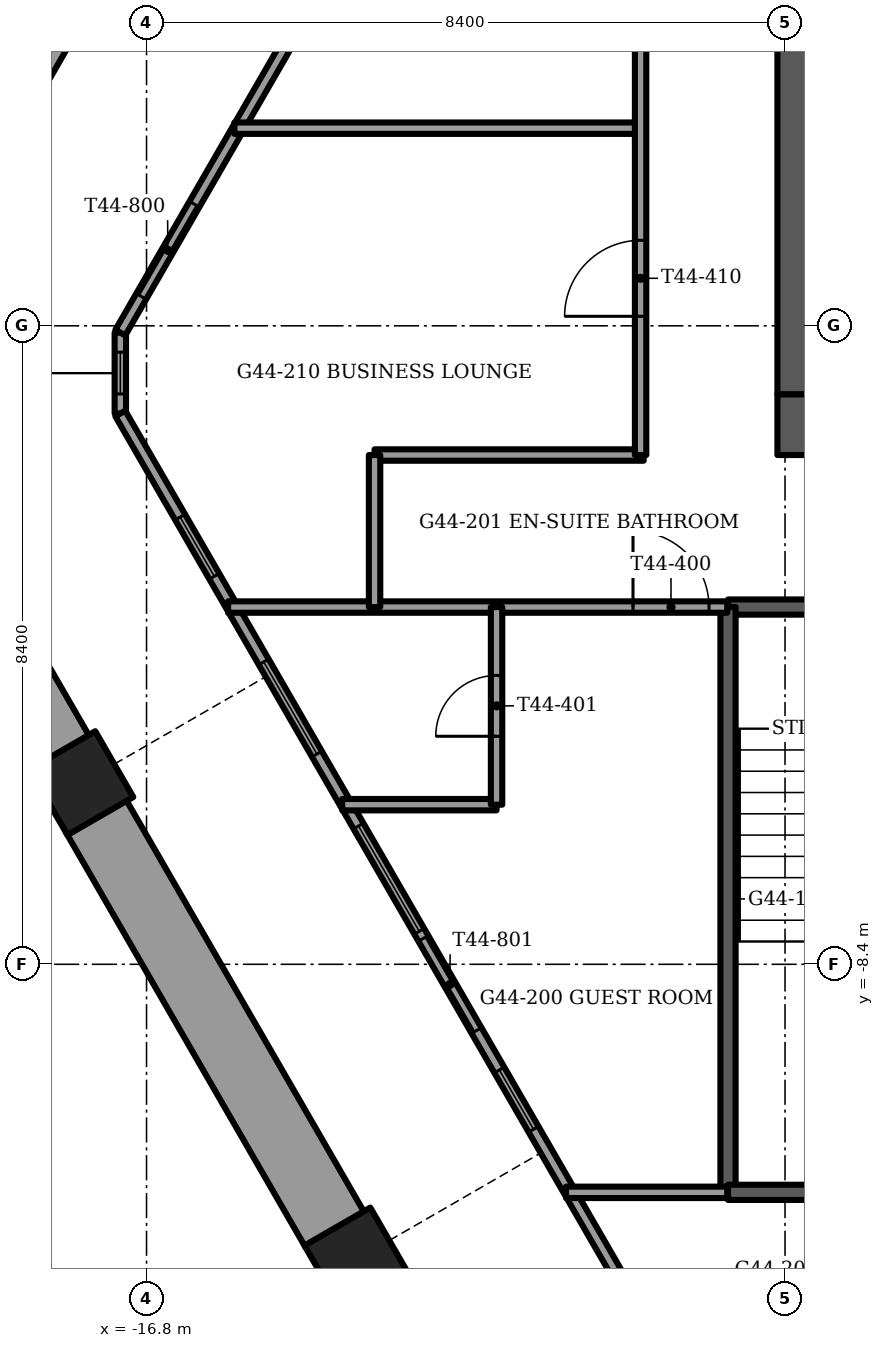
"""IFC4 building model, lengths in metres.
Left out: names, types, materials, properties, quantities, classifications, styles, units other than length and angle.
Written with IfcOpenShell. Run it as: python <this file> out.ifc"""

import sys

from ifc_helpers import new_model, si_unit, direction, frame, frame_2d, origin, origin_2d, place, context, subcontext, project, spatial, rectangle, extrude, element, fill, save


model = new_model("IFC4")
c1 = context("Model", 3, precision=1e-05, world=origin(), true_north=direction((0.0, 1.0)))
c2 = subcontext(c1, "Body", "Model", "MODEL_VIEW")
j1 = project(units=[si_unit("LENGTHUNIT", "METRE"), si_unit("PLANEANGLEUNIT", "RADIAN")], contexts=[c1])
p1 = place(None, origin())
s1 = spatial("IfcSite", under=j1, at=p1, CompositionType="ELEMENT")
p2 = place(p1, origin())
s2 = spatial("IfcBuilding", under=s1, at=p2, CompositionType="ELEMENT")
p3 = place(p2, frame((0.0, 0.0, 179.5)))
s3 = spatial("IfcBuildingStorey", under=s2, at=p3, CompositionType="ELEMENT", Elevation=179.5)
for number, where, z_axis, x_axis in (
    (1, (-17.657, -6.017, -1.2), (0.0, 0.0, 1.0), (-0.5, 0.866, 0.0)),
    (2, (-14.039, -12.283, -1.2), (0.0, 0.0, 1.0), (-0.5, 0.866, 0.0)),
):
    element("IfcColumn", number, at=place(p3, frame(where, z_axis=z_axis, x_axis=x_axis)), inside=s3, PredefinedType="COLUMN", context=c2, shape_type="SweptSolid", body=[
        extrude(rectangle(XDim=1.0, YDim=1.0, at=origin_2d()), origin(), (0.0, 0.0, 1.0), 3.75),
    ])
p4 = place(p3, frame((-8.5, -1.3, -0.3), z_axis=(0.0, 0.0, 1.0), x_axis=(1.0, 0.0, 0.0)))
e3 = element("IfcWall", 3, at=p4, inside=s3, PredefinedType="SHEAR", context=c2, shape_type="SweptSolid", body=[
    extrude(rectangle(XDim=17.0, YDim=0.8, at=frame_2d((8.5, 0.0))), origin(), (0.0, 0.0, 1.0), 3.75),
])
p5 = place(p4, frame((7.7, 0.0, 0.0)))
e4 = element("IfcOpeningElement", 4, at=p5, cuts=e3, PredefinedType="OPENING", context=c2, shape_type="SweptSolid", body=[
    extrude(rectangle(XDim=1.6, YDim=2.1, at=frame_2d((0.8, 1.05))), frame((0.0, 0.4, 0.0), z_axis=(0.0, -1.0, 0.0), x_axis=(1.0, 0.0, 0.0)), (0.0, 0.0, 1.0), 0.8),
])
p6 = place(p3, frame((-8.1, -0.9, -0.3), z_axis=(0.0, 0.0, 1.0), x_axis=(0.0, 1.0, 0.0)))
e5 = element("IfcWall", 5, at=p6, inside=s3, PredefinedType="SHEAR", context=c2, shape_type="SweptSolid", body=[
    extrude(rectangle(XDim=9.8, YDim=0.8, at=frame_2d((4.9, 0.0))), origin(), (0.0, 0.0, 1.0), 3.75),
])
p7 = place(p6, frame((8.15, 0.0, 0.0)))
e6 = element("IfcOpeningElement", 6, at=p7, cuts=e5, PredefinedType="OPENING", context=c2, shape_type="SweptSolid", body=[
    extrude(rectangle(XDim=1.1, YDim=2.1, at=frame_2d((0.55, 1.05))), frame((0.0, 0.4, 0.0), z_axis=(0.0, -1.0, 0.0), x_axis=(1.0, 0.0, 0.0)), (0.0, 0.0, 1.0), 0.8),
])
p8 = place(p3, frame((-17.397, 5.324, 0.0), z_axis=(0.0, 0.0, 1.0), x_axis=(-0.500017688138, -0.866015191293, 0.0)))
e7 = element("IfcWall", 7, at=p8, inside=s3, PredefinedType="PARAPET", context=c2, shape_type="SweptSolid", body=[
    extrude(rectangle(XDim=6.323, YDim=0.9, at=frame_2d((3.162, 0.0))), origin(), (0.0, 0.0, 1.0), 1.1),
])
p9 = place(p3, frame((-20.559, -1.092, 0.0), z_axis=(0.0, 0.0, 1.0), x_axis=(0.500023253097, -0.866011978186, 0.0)))
e8 = element("IfcWall", 8, at=p9, inside=s3, PredefinedType="PARAPET", context=c2, shape_type="SweptSolid", body=[
    extrude(rectangle(XDim=5.246, YDim=0.9, at=frame_2d((2.623, 0.0))), origin(), (0.0, 0.0, 1.0), 1.1),
])
p10 = place(p3, frame((-17.466, -6.449, 0.0), z_axis=(0.0, 0.0, 1.0), x_axis=(0.500013351051, -0.866017695414, 0.0)))
e9 = element("IfcWall", 9, at=p10, inside=s3, PredefinedType="PARAPET", context=c2, shape_type="SweptSolid", body=[
    extrude(rectangle(XDim=6.296, YDim=0.9, at=frame_2d((3.148, 0.0))), origin(), (0.0, 0.0, 1.0), 1.1),
])
p11 = place(p3, frame((-7.109, 17.292, 0.0), z_axis=(0.0, 0.0, 1.0), x_axis=(-0.499999728453, -0.866025560562, 0.0)))
e10 = element("IfcWall", 10, at=p11, inside=s3, PredefinedType="SOLIDWALL", context=c2, shape_type="SweptSolid", body=[
    extrude(rectangle(XDim=20.071, YDim=0.15, at=frame_2d((10.035, 0.0))), origin(), (0.0, 0.0, 1.0), 3.45),
])
p12 = place(p11, frame((3.868, 0.0, 0.15)))
e11 = element("IfcOpeningElement", 11, at=p12, cuts=e10, PredefinedType="OPENING", context=c2, shape_type="SweptSolid", body=[
    extrude(rectangle(XDim=1.4, YDim=2.85, at=frame_2d((0.7, 1.425))), frame((0.0, 0.075, 0.0), z_axis=(0.0, -1.0, 0.0), x_axis=(1.0, 0.0, 0.0)), (0.0, 0.0, 1.0), 0.15),
])
p13 = place(p11, frame((7.521, 0.0, 0.15)))
e12 = element("IfcOpeningElement", 12, at=p13, cuts=e10, PredefinedType="OPENING", context=c2, shape_type="SweptSolid", body=[
    extrude(rectangle(XDim=1.6, YDim=2.85, at=frame_2d((0.8, 1.425))), frame((0.0, 0.075, 0.0), z_axis=(0.0, -1.0, 0.0), x_axis=(1.0, 0.0, 0.0)), (0.0, 0.0, 1.0), 0.15),
])
p14 = place(p11, frame((9.721, 0.0, 0.15)))
e13 = element("IfcOpeningElement", 13, at=p14, cuts=e10, PredefinedType="OPENING", context=c2, shape_type="SweptSolid", body=[
    extrude(rectangle(XDim=1.4, YDim=2.85, at=frame_2d((0.7, 1.425))), frame((0.0, 0.075, 0.0), z_axis=(0.0, -1.0, 0.0), x_axis=(1.0, 0.0, 0.0)), (0.0, 0.0, 1.0), 0.15),
])
p15 = place(p11, frame((11.721, 0.0, 0.15)))
e14 = element("IfcOpeningElement", 14, at=p15, cuts=e10, PredefinedType="OPENING", context=c2, shape_type="SweptSolid", body=[
    extrude(rectangle(XDim=1.6, YDim=2.85, at=frame_2d((0.8, 1.425))), frame((0.0, 0.075, 0.0), z_axis=(0.0, -1.0, 0.0), x_axis=(1.0, 0.0, 0.0)), (0.0, 0.0, 1.0), 0.15),
])
p16 = place(p11, frame((13.921, 0.0, 0.15)))
e15 = element("IfcOpeningElement", 15, at=p16, cuts=e10, PredefinedType="OPENING", context=c2, shape_type="SweptSolid", body=[
    extrude(rectangle(XDim=1.4, YDim=2.85, at=frame_2d((0.7, 1.425))), frame((0.0, 0.075, 0.0), z_axis=(0.0, -1.0, 0.0), x_axis=(1.0, 0.0, 0.0)), (0.0, 0.0, 1.0), 0.15),
])
p17 = place(p11, frame((18.121, 0.0, 0.0)))
e16 = element("IfcOpeningElement", 16, at=p17, cuts=e10, PredefinedType="OPENING", context=c2, shape_type="SweptSolid", body=[
    extrude(rectangle(XDim=1.4, YDim=2.4, at=frame_2d((0.7, 1.2))), frame((0.0, 0.075, 0.0), z_axis=(0.0, -1.0, 0.0), x_axis=(1.0, 0.0, 0.0)), (0.0, 0.0, 1.0), 0.15),
])
p18 = place(p11, frame((0.452, 0.0, 0.15)))
e17 = element("IfcOpeningElement", 17, at=p18, cuts=e10, PredefinedType="OPENING", context=c2, shape_type="SweptSolid", body=[
    extrude(rectangle(XDim=1.6, YDim=2.73, at=frame_2d((0.8, 1.365))), frame((0.0, 0.075, 0.0), z_axis=(0.0, -1.0, 0.0), x_axis=(1.0, 0.0, 0.0)), (0.0, 0.0, 1.0), 0.15),
])
p19 = place(p3, frame((-17.145, -1.154, 0.0), z_axis=(0.0, 0.0, 1.0), x_axis=(0.500005248668, -0.866022373443, 0.0)))
e18 = element("IfcWall", 18, at=p19, inside=s3, PredefinedType="SOLIDWALL", context=c2, shape_type="SweptSolid", body=[
    extrude(rectangle(XDim=15.145, YDim=0.15, at=frame_2d((7.573, 0.0))), origin(), (0.0, 0.0, 1.0), 3.45),
])
p20 = place(p19, frame((1.573, 0.0, 0.15)))
e19 = element("IfcOpeningElement", 19, at=p20, cuts=e18, PredefinedType="OPENING", context=c2, shape_type="SweptSolid", body=[
    extrude(rectangle(XDim=0.9, YDim=2.85, at=frame_2d((0.45, 1.425))), frame((0.0, 0.075, 0.0), z_axis=(0.0, -1.0, 0.0), x_axis=(1.0, 0.0, 0.0)), (0.0, 0.0, 1.0), 0.15),
])
p21 = place(p19, frame((3.773, 0.0, 0.15)))
e20 = element("IfcOpeningElement", 20, at=p21, cuts=e18, PredefinedType="OPENING", context=c2, shape_type="SweptSolid", body=[
    extrude(rectangle(XDim=1.4, YDim=2.85, at=frame_2d((0.7, 1.425))), frame((0.0, 0.075, 0.0), z_axis=(0.0, -1.0, 0.0), x_axis=(1.0, 0.0, 0.0)), (0.0, 0.0, 1.0), 0.15),
])
p22 = place(p19, frame((6.266, 0.0, 0.15)))
e21 = element("IfcOpeningElement", 21, at=p22, cuts=e18, PredefinedType="OPENING", context=c2, shape_type="SweptSolid", body=[
    extrude(rectangle(XDim=1.6, YDim=2.85, at=frame_2d((0.8, 1.425))), frame((0.0, 0.075, 0.0), z_axis=(0.0, -1.0, 0.0), x_axis=(1.0, 0.0, 0.0)), (0.0, 0.0, 1.0), 0.15),
])
p23 = place(p19, frame((7.973, 0.0, 0.0)))
e22 = element("IfcOpeningElement", 22, at=p23, cuts=e18, PredefinedType="OPENING", context=c2, shape_type="SweptSolid", body=[
    extrude(rectangle(XDim=1.4, YDim=2.4, at=frame_2d((0.7, 1.2))), frame((0.0, 0.075, 0.0), z_axis=(0.0, -1.0, 0.0), x_axis=(1.0, 0.0, 0.0)), (0.0, 0.0, 1.0), 0.15),
])
p24 = place(p19, frame((9.973, 0.0, 0.15)))
e23 = element("IfcOpeningElement", 23, at=p24, cuts=e18, PredefinedType="OPENING", context=c2, shape_type="SweptSolid", body=[
    extrude(rectangle(XDim=0.9, YDim=2.85, at=frame_2d((0.45, 1.425))), frame((0.0, 0.075, 0.0), z_axis=(0.0, -1.0, 0.0), x_axis=(1.0, 0.0, 0.0)), (0.0, 0.0, 1.0), 0.15),
])
p25 = place(p3, frame((-17.145, -0.089, 0.0), z_axis=(0.0, 0.0, 1.0), x_axis=(0.0, -1.0, 0.0)))
e24 = element("IfcWall", 24, at=p25, inside=s3, PredefinedType="SOLIDWALL", context=c2, shape_type="SweptSolid", body=[
    extrude(rectangle(XDim=1.065, YDim=0.15, at=frame_2d((0.532, 0.0))), origin(), (0.0, 0.0, 1.0), 3.45),
])
p26 = place(p25, frame((0.258, 0.0, 0.15)))
e25 = element("IfcOpeningElement", 25, at=p26, cuts=e24, PredefinedType="OPENING", context=c2, shape_type="SweptSolid", body=[
    extrude(rectangle(XDim=0.55, YDim=2.85, at=frame_2d((0.275, 1.425))), frame((0.0, 0.075, 0.0), z_axis=(0.0, -1.0, 0.0), x_axis=(1.0, 0.0, 0.0)), (0.0, 0.0, 1.0), 0.15),
])
p27 = place(p3, frame((-9.15, -3.7, -0.3), z_axis=(0.0, 0.0, 1.0), x_axis=(1.0, 0.0, 0.0)))
e26 = element("IfcWall", 26, at=p27, inside=s3, PredefinedType="SOLIDWALL", context=c2, shape_type="SweptSolid", body=[
    extrude(rectangle(XDim=3.35, YDim=0.2, at=frame_2d((1.675, 0.0))), origin(), (0.0, 0.0, 1.0), 3.75),
])
p28 = place(p27, frame((1.125, 0.0, 0.0)))
e27 = element("IfcOpeningElement", 27, at=p28, cuts=e26, PredefinedType="OPENING", context=c2, shape_type="SweptSolid", body=[
    extrude(rectangle(XDim=1.1, YDim=2.1, at=frame_2d((0.55, 1.05))), frame((0.0, 0.1, 0.0), z_axis=(0.0, -1.0, 0.0), x_axis=(1.0, 0.0, 0.0)), (0.0, 0.0, 1.0), 0.2),
])
p29 = place(p3, frame((-9.15, -3.7, -0.3), z_axis=(0.0, 0.0, 1.0), x_axis=(0.0, -1.0, 0.0)))
e28 = element("IfcWall", 28, at=p29, inside=s3, PredefinedType="SOLIDWALL", context=c2, shape_type="SweptSolid", body=[
    extrude(rectangle(XDim=7.7, YDim=0.2, at=frame_2d((3.85, 0.0))), origin(), (0.0, 0.0, 1.0), 3.75),
])
p30 = place(p3, frame((-9.15, -11.4, -0.3), z_axis=(0.0, 0.0, 1.0), x_axis=(1.0, 0.0, 0.0)))
e29 = element("IfcWall", 29, at=p30, inside=s3, PredefinedType="SOLIDWALL", context=c2, shape_type="SweptSolid", body=[
    extrude(rectangle(XDim=3.35, YDim=0.2, at=frame_2d((1.675, 0.0))), origin(), (0.0, 0.0, 1.0), 3.75),
])
p31 = place(p3, frame((-11.281, -11.4, 0.0), z_axis=(0.0, 0.0, 1.0), x_axis=(1.0, 0.0, 0.0)))
e30 = element("IfcWall", 30, at=p31, inside=s3, PredefinedType="PARTITIONING", context=c2, shape_type="SweptSolid", body=[
    extrude(rectangle(XDim=2.121, YDim=0.15, at=frame_2d((1.061, 0.0))), origin(), (0.0, 0.0, 1.0), 3.45),
])
p32 = place(p3, frame((-14.226, -6.3, 0.0), z_axis=(0.0, 0.0, 1.0), x_axis=(1.0, 0.0, 0.0)))
e31 = element("IfcWall", 31, at=p32, inside=s3, PredefinedType="PARTITIONING", context=c2, shape_type="SweptSolid", body=[
    extrude(rectangle(XDim=2.031, YDim=0.15, at=frame_2d((1.016, 0.0))), origin(), (0.0, 0.0, 1.0), 3.45),
])
p33 = place(p3, frame((-15.727, -3.7, 0.0), z_axis=(0.0, 0.0, 1.0), x_axis=(1.0, 0.0, 0.0)))
e32 = element("IfcWall", 32, at=p33, inside=s3, PredefinedType="PARTITIONING", context=c2, shape_type="SweptSolid", body=[
    extrude(rectangle(XDim=6.567, YDim=0.15, at=frame_2d((3.284, 0.0))), origin(), (0.0, 0.0, 1.0), 3.45),
])
p34 = place(p33, frame((5.327, 0.0, 0.0)))
e33 = element("IfcOpeningElement", 33, at=p34, cuts=e32, PredefinedType="OPENING", context=c2, shape_type="SweptSolid", body=[
    extrude(rectangle(XDim=1.0, YDim=2.1, at=frame_2d((0.5, 1.05))), frame((0.0, 0.075, 0.0), z_axis=(0.0, -1.0, 0.0), x_axis=(1.0, 0.0, 0.0)), (0.0, 0.0, 1.0), 0.15),
])
p35 = place(p3, frame((-13.8, -1.7, 0.0), z_axis=(0.0, 0.0, 1.0), x_axis=(1.0, 0.0, 0.0)))
e34 = element("IfcWall", 34, at=p35, inside=s3, PredefinedType="PARTITIONING", context=c2, shape_type="SweptSolid", body=[
    extrude(rectangle(XDim=3.54, YDim=0.15, at=frame_2d((1.77, 0.0))), origin(), (0.0, 0.0, 1.0), 3.45),
])
p36 = place(p3, frame((-15.644, 2.6, 0.0), z_axis=(0.0, 0.0, 1.0), x_axis=(1.0, 0.0, 0.0)))
e35 = element("IfcWall", 35, at=p36, inside=s3, PredefinedType="PARTITIONING", context=c2, shape_type="SweptSolid", body=[
    extrude(rectangle(XDim=5.344, YDim=0.15, at=frame_2d((2.672, 0.0))), origin(), (0.0, 0.0, 1.0), 3.45),
])
p37 = place(p3, frame((-10.3, -1.7, 0.0), z_axis=(0.0, 0.0, 1.0), x_axis=(0.0, 1.0, 0.0)))
e36 = element("IfcWall", 36, at=p37, inside=s3, PredefinedType="PARTITIONING", context=c2, shape_type="SweptSolid", body=[
    extrude(rectangle(XDim=13.556, YDim=0.15, at=frame_2d((6.778, 0.0))), origin(), (0.0, 0.0, 1.0), 3.45),
])
p38 = place(p37, frame((1.825, 0.0, 0.0)))
e37 = element("IfcOpeningElement", 37, at=p38, cuts=e36, PredefinedType="OPENING", context=c2, shape_type="SweptSolid", body=[
    extrude(rectangle(XDim=1.0, YDim=2.1, at=frame_2d((0.5, 1.05))), frame((0.0, 0.075, 0.0), z_axis=(0.0, -1.0, 0.0), x_axis=(1.0, 0.0, 0.0)), (0.0, 0.0, 1.0), 0.15),
])
p39 = place(p37, frame((8.307, 0.0, 0.0)))
e38 = element("IfcOpeningElement", 38, at=p39, cuts=e36, PredefinedType="OPENING", context=c2, shape_type="SweptSolid", body=[
    extrude(rectangle(XDim=1.0, YDim=2.1, at=frame_2d((0.5, 1.05))), frame((0.0, 0.075, 0.0), z_axis=(0.0, -1.0, 0.0), x_axis=(1.0, 0.0, 0.0)), (0.0, 0.0, 1.0), 0.15),
])
p40 = place(p3, frame((-12.195, -6.3, 0.0), z_axis=(0.0, 0.0, 1.0), x_axis=(0.0, 1.0, 0.0)))
e39 = element("IfcWall", 39, at=p40, inside=s3, PredefinedType="PARTITIONING", context=c2, shape_type="SweptSolid", body=[
    extrude(rectangle(XDim=2.6, YDim=0.15, at=frame_2d((1.3, 0.0))), origin(), (0.0, 0.0, 1.0), 3.45),
])
p41 = place(p40, frame((0.9, 0.0, 0.0)))
e40 = element("IfcOpeningElement", 40, at=p41, cuts=e39, PredefinedType="OPENING", context=c2, shape_type="SweptSolid", body=[
    extrude(rectangle(XDim=0.8, YDim=2.1, at=frame_2d((0.4, 1.05))), frame((0.0, 0.075, 0.0), z_axis=(0.0, -1.0, 0.0), x_axis=(1.0, 0.0, 0.0)), (0.0, 0.0, 1.0), 0.15),
])
p42 = place(p3, frame((-13.8, -3.7, 0.0), z_axis=(0.0, 0.0, 1.0), x_axis=(0.0, 1.0, 0.0)))
e41 = element("IfcWall", 41, at=p42, inside=s3, PredefinedType="PARTITIONING", context=c2, shape_type="SweptSolid", body=[
    extrude(rectangle(XDim=2.0, YDim=0.15, at=frame_2d((1.0, 0.0))), origin(), (0.0, 0.0, 1.0), 3.45),
])
p43 = place(p17, origin())
e42 = element("IfcDoor", 42, at=p43, inside=s3, OperationType="SLIDING_TO_RIGHT", PredefinedType="DOOR", context=c2, shape_type="SweptSolid", body=[
    extrude(rectangle(XDim=1.4, YDim=2.4, at=frame_2d((0.7, 1.2))), frame((0.0, 0.025, 0.0), z_axis=(0.0, -1.0, 0.0), x_axis=(1.0, 0.0, 0.0)), (0.0, 0.0, 1.0), 0.05),
])
fill(e16, e42)
p44 = place(p20, origin())
e43 = element("IfcWindow", 43, at=p44, inside=s3, PartitioningType="SINGLE_PANEL", PredefinedType="WINDOW", context=c2, shape_type="SweptSolid", body=[
    extrude(rectangle(XDim=0.9, YDim=2.85, at=frame_2d((0.45, 1.425))), frame((0.0, 0.03, 0.0), z_axis=(0.0, -1.0, 0.0), x_axis=(1.0, 0.0, 0.0)), (0.0, 0.0, 1.0), 0.06),
])
fill(e19, e43)
p45 = place(p21, origin())
e44 = element("IfcWindow", 44, at=p45, inside=s3, PartitioningType="SINGLE_PANEL", PredefinedType="WINDOW", context=c2, shape_type="SweptSolid", body=[
    extrude(rectangle(XDim=1.4, YDim=2.85, at=frame_2d((0.7, 1.425))), frame((0.0, 0.03, 0.0), z_axis=(0.0, -1.0, 0.0), x_axis=(1.0, 0.0, 0.0)), (0.0, 0.0, 1.0), 0.06),
])
fill(e20, e44)
p46 = place(p22, origin())
e45 = element("IfcWindow", 45, at=p46, inside=s3, PartitioningType="SINGLE_PANEL", PredefinedType="WINDOW", context=c2, shape_type="SweptSolid", body=[
    extrude(rectangle(XDim=1.6, YDim=2.85, at=frame_2d((0.8, 1.425))), frame((0.0, 0.03, 0.0), z_axis=(0.0, -1.0, 0.0), x_axis=(1.0, 0.0, 0.0)), (0.0, 0.0, 1.0), 0.06),
])
fill(e21, e45)
p47 = place(p23, origin())
e46 = element("IfcDoor", 46, at=p47, inside=s3, OperationType="SLIDING_TO_RIGHT", PredefinedType="DOOR", context=c2, shape_type="SweptSolid", body=[
    extrude(rectangle(XDim=1.4, YDim=2.4, at=frame_2d((0.7, 1.2))), frame((0.0, 0.025, 0.0), z_axis=(0.0, -1.0, 0.0), x_axis=(1.0, 0.0, 0.0)), (0.0, 0.0, 1.0), 0.05),
])
fill(e22, e46)
p48 = place(p24, origin())
e47 = element("IfcWindow", 47, at=p48, inside=s3, PartitioningType="SINGLE_PANEL", PredefinedType="WINDOW", context=c2, shape_type="SweptSolid", body=[
    extrude(rectangle(XDim=0.9, YDim=2.85, at=frame_2d((0.45, 1.425))), frame((0.0, 0.03, 0.0), z_axis=(0.0, -1.0, 0.0), x_axis=(1.0, 0.0, 0.0)), (0.0, 0.0, 1.0), 0.06),
])
fill(e23, e47)
p49 = place(p26, origin())
e48 = element("IfcWindow", 48, at=p49, inside=s3, PartitioningType="SINGLE_PANEL", PredefinedType="WINDOW", context=c2, shape_type="SweptSolid", body=[
    extrude(rectangle(XDim=0.55, YDim=2.85, at=frame_2d((0.275, 1.425))), frame((0.0, 0.03, 0.0), z_axis=(0.0, -1.0, 0.0), x_axis=(1.0, 0.0, 0.0)), (0.0, 0.0, 1.0), 0.06),
])
fill(e25, e48)
p50 = place(p34, origin())
e49 = element("IfcDoor", 49, at=p50, inside=s3, OperationType="SINGLE_SWING_RIGHT", PredefinedType="DOOR", context=c2, shape_type="SweptSolid", body=[
    extrude(rectangle(XDim=1.0, YDim=2.1, at=frame_2d((0.5, 1.05))), frame((0.0, 0.025, 0.0), z_axis=(0.0, -1.0, 0.0), x_axis=(1.0, 0.0, 0.0)), (0.0, 0.0, 1.0), 0.05),
])
fill(e33, e49)
p51 = place(p41, origin())
e50 = element("IfcDoor", 50, at=p51, inside=s3, OperationType="SINGLE_SWING_RIGHT", PredefinedType="DOOR", context=c2, shape_type="SweptSolid", body=[
    extrude(rectangle(XDim=0.8, YDim=2.1, at=frame_2d((0.4, 1.05))), frame((0.0, 0.025, 0.0), z_axis=(0.0, -1.0, 0.0), x_axis=(1.0, 0.0, 0.0)), (0.0, 0.0, 1.0), 0.05),
])
fill(e40, e50)
p52 = place(p38, origin())
e51 = element("IfcDoor", 51, at=p52, inside=s3, OperationType="SINGLE_SWING_RIGHT", PredefinedType="DOOR", context=c2, shape_type="SweptSolid", body=[
    extrude(rectangle(XDim=1.0, YDim=2.1, at=frame_2d((0.5, 1.05))), frame((0.0, 0.025, 0.0), z_axis=(0.0, -1.0, 0.0), x_axis=(1.0, 0.0, 0.0)), (0.0, 0.0, 1.0), 0.05),
])
fill(e37, e51)
save(model, sys.argv[1])
